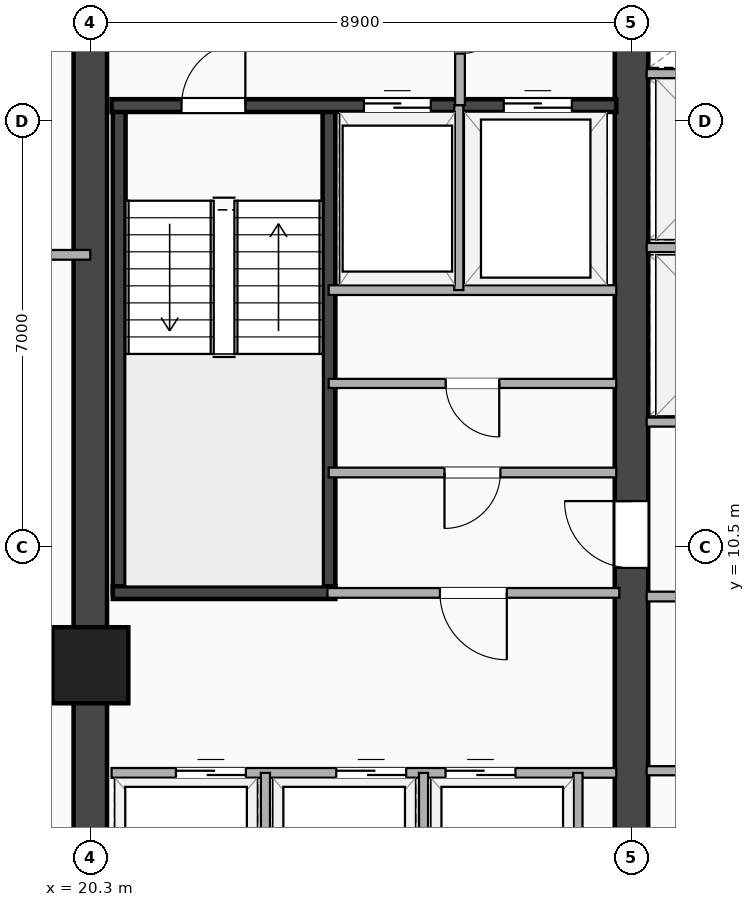
"""IFC4 building model, lengths in metres.
Left out: names, types, materials, properties, quantities, classifications, styles, units other than length and angle.
Written with IfcOpenShell. Run it as: python <this file> out.ifc"""

import sys

from ifc_helpers import new_model, si_unit, direction, frame, frame_2d, origin, origin_2d, place, context, subcontext, project, spatial, rectangle, extrude, element, fill, save


model = new_model("IFC4")
c1 = context("Model", 3, precision=1e-05, world=origin(), true_north=direction((0.0, 1.0)))
c2 = subcontext(c1, "Body", "Model", "MODEL_VIEW")
j1 = project(units=[si_unit("LENGTHUNIT", "METRE"), si_unit("PLANEANGLEUNIT", "RADIAN")], contexts=[c1])
p1 = place(None, origin())
s1 = spatial("IfcSite", under=j1, at=p1, CompositionType="ELEMENT")
p2 = place(p1, origin())
s2 = spatial("IfcBuilding", under=s1, at=p2, CompositionType="ELEMENT")
p3 = place(p2, frame((0.0, 0.0, 91.7)))
s3 = spatial("IfcBuildingStorey", under=s2, at=p3, CompositionType="ELEMENT", Elevation=91.7)
p4 = place(p3, frame((20.3, 3.5, 0.0), z_axis=(0.0, 0.0, 1.0), x_axis=(0.0, 1.0, 0.0)))
e1 = element("IfcWall", 1, at=p4, inside=s3, PredefinedType="SHEAR", context=c2, shape_type="SweptSolid", body=[
    extrude(rectangle(XDim=16.9, YDim=0.55, at=frame_2d((8.45, 0.0))), origin(), (0.0, 0.0, 1.0), 3.24),
])
p5 = place(p3, frame((29.2, 3.5, 0.0), z_axis=(0.0, 0.0, 1.0), x_axis=(0.0, 1.0, 0.0)))
e2 = element("IfcWall", 2, at=p5, inside=s3, PredefinedType="SHEAR", context=c2, shape_type="SweptSolid", body=[
    extrude(rectangle(XDim=16.9, YDim=0.55, at=frame_2d((8.45, 0.0))), origin(), (0.0, 0.0, 1.0), 3.24),
])
p6 = place(p5, frame((7.75, 0.0, 0.0), z_axis=(0.0, 0.0, 1.0), x_axis=(-1.0, 0.0, 0.0)))
e3 = element("IfcOpeningElement", 3, at=p6, cuts=e2, PredefinedType="OPENING", context=c2, shape_type="SweptSolid", body=[
    extrude(rectangle(XDim=1.1, YDim=2.15, at=frame_2d((0.55, 1.075))), frame((0.0, 0.285, 0.0), z_axis=(0.0, -1.0, 0.0), x_axis=(1.0, 0.0, 0.0)), (0.0, 0.0, 1.0), 0.57),
])
for number, where, z_axis, x_axis in (
    (4, (20.775, 9.745, 0.0), (0.0, 0.0, 1.0), (0.0, 1.0, 0.0)),
    (5, (24.225, 9.745, 0.0), (0.0, 0.0, 1.0), (0.0, 1.0, 0.0)),
):
    element("IfcWall", number, at=place(p3, frame(where, z_axis=z_axis, x_axis=x_axis)), inside=s3, PredefinedType="SHEAR", context=c2, shape_type="SweptSolid", body=[
        extrude(rectangle(XDim=8.01, YDim=0.21, at=frame_2d((4.005, 0.0))), origin(), (0.0, 0.0, 1.0), 3.24),
    ])
p7 = place(p3, frame((20.67, 9.745, 0.0), z_axis=(0.0, 0.0, 1.0), x_axis=(1.0, 0.0, 0.0)))
e6 = element("IfcWall", 6, at=p7, inside=s3, PredefinedType="SHEAR", context=c2, shape_type="SweptSolid", body=[
    extrude(rectangle(XDim=3.66, YDim=0.21, at=frame_2d((1.83, 0.0))), origin(), (0.0, 0.0, 1.0), 3.24),
])
p8 = place(p3, frame((20.65, 17.755, 0.0), z_axis=(0.0, 0.0, 1.0), x_axis=(1.0, 0.0, 0.0)))
e7 = element("IfcWall", 7, at=p8, inside=s3, PredefinedType="SHEAR", context=c2, shape_type="SweptSolid", body=[
    extrude(rectangle(XDim=8.3, YDim=0.21, at=frame_2d((4.15, 0.0))), origin(), (0.0, 0.0, 1.0), 3.24),
])
p9 = place(p8, frame((2.2, 0.0, 0.0), z_axis=(0.0, 0.0, 1.0), x_axis=(-1.0, 0.0, 0.0)))
e8 = element("IfcOpeningElement", 8, at=p9, cuts=e7, PredefinedType="OPENING", context=c2, shape_type="SweptSolid", body=[
    extrude(rectangle(XDim=1.05, YDim=2.15, at=frame_2d((0.525, 1.075))), frame((0.0, 0.115, 0.0), z_axis=(0.0, -1.0, 0.0), x_axis=(1.0, 0.0, 0.0)), (0.0, 0.0, 1.0), 0.23),
])
p10 = place(p8, frame((4.15, 0.0, 0.0)))
e9 = element("IfcOpeningElement", 9, at=p10, cuts=e7, PredefinedType="OPENING", context=c2, shape_type="SweptSolid", body=[
    extrude(rectangle(XDim=1.1, YDim=2.18, at=frame_2d((0.55, 1.09))), frame((0.0, 0.115, 0.0), z_axis=(0.0, -1.0, 0.0), x_axis=(1.0, 0.0, 0.0)), (0.0, 0.0, 1.0), 0.23),
])
p11 = place(p8, frame((6.45, 0.0, 0.0)))
e10 = element("IfcOpeningElement", 10, at=p11, cuts=e7, PredefinedType="OPENING", context=c2, shape_type="SweptSolid", body=[
    extrude(rectangle(XDim=1.12, YDim=2.2, at=frame_2d((0.56, 1.1))), frame((0.0, 0.115, 0.0), z_axis=(0.0, -1.0, 0.0), x_axis=(1.0, 0.0, 0.0)), (0.0, 0.0, 1.0), 0.23),
])
p12 = place(p3, frame((20.3, 8.55, -0.26), z_axis=(0.0, 0.0, 1.0), x_axis=(1.0, 0.0, 0.0)))
e11 = element("IfcColumn", 11, at=p12, inside=s3, PredefinedType="COLUMN", context=c2, shape_type="SweptSolid", body=[
    extrude(rectangle(XDim=1.25, YDim=1.25, at=origin_2d()), origin(), (0.0, 0.0, 1.0), 3.5),
])
p13 = place(p3, frame((26.38, 17.76, 0.0), z_axis=(0.0, 0.0, 1.0), x_axis=(0.0, 1.0, 0.0)))
e12 = element("IfcWall", 12, at=p13, inside=s3, PredefinedType="PARTITIONING", context=c2, shape_type="SweptSolid", body=[
    extrude(rectangle(XDim=2.66, YDim=0.16, at=frame_2d((1.33, 0.0))), origin(), (0.0, 0.0, 1.0), 2.614),
])
p14 = place(p13, frame((0.85, 0.0, 0.0)))
e13 = element("IfcOpeningElement", 13, at=p14, cuts=e12, PredefinedType="OPENING", context=c2, shape_type="SweptSolid", body=[
    extrude(rectangle(XDim=0.88, YDim=2.08, at=frame_2d((0.44, 1.04))), frame((0.0, 0.09, 0.0), z_axis=(0.0, -1.0, 0.0), x_axis=(1.0, 0.0, 0.0)), (0.0, 0.0, 1.0), 0.18),
])
p15 = place(p3, frame((24.22, 14.72, 0.0), z_axis=(0.0, 0.0, 1.0), x_axis=(1.0, 0.0, 0.0)))
e14 = element("IfcWall", 14, at=p15, inside=s3, PredefinedType="PARTITIONING", context=c2, shape_type="SweptSolid", body=[
    extrude(rectangle(XDim=4.73, YDim=0.16, at=frame_2d((2.365, 0.0))), origin(), (0.0, 0.0, 1.0), 3.24),
])
p16 = place(p3, frame((26.36, 14.72, 0.0), z_axis=(0.0, 0.0, 1.0), x_axis=(0.0, 1.0, 0.0)))
e15 = element("IfcWall", 15, at=p16, inside=s3, PredefinedType="PARTITIONING", context=c2, shape_type="SweptSolid", body=[
    extrude(rectangle(XDim=3.04, YDim=0.15, at=frame_2d((1.52, 0.0))), origin(), (0.0, 0.0, 1.0), 3.24),
])
p17 = place(p3, frame((24.22, 11.72, 0.0), z_axis=(0.0, 0.0, 1.0), x_axis=(1.0, 0.0, 0.0)))
e16 = element("IfcWall", 16, at=p17, inside=s3, PredefinedType="PARTITIONING", context=c2, shape_type="SweptSolid", body=[
    extrude(rectangle(XDim=4.73, YDim=0.16, at=frame_2d((2.365, 0.0))), origin(), (0.0, 0.0, 1.0), 3.24),
])
p18 = place(p17, frame((1.905, 0.0, 0.0)))
e17 = element("IfcOpeningElement", 17, at=p18, cuts=e16, PredefinedType="OPENING", context=c2, shape_type="SweptSolid", body=[
    extrude(rectangle(XDim=0.92, YDim=2.08, at=frame_2d((0.46, 1.04))), frame((0.0, 0.09, 0.0), z_axis=(0.0, -1.0, 0.0), x_axis=(1.0, 0.0, 0.0)), (0.0, 0.0, 1.0), 0.18),
])
p19 = place(p3, frame((24.22, 13.185, 0.0), z_axis=(0.0, 0.0, 1.0), x_axis=(1.0, 0.0, 0.0)))
e18 = element("IfcWall", 18, at=p19, inside=s3, PredefinedType="PARTITIONING", context=c2, shape_type="SweptSolid", body=[
    extrude(rectangle(XDim=4.73, YDim=0.15, at=frame_2d((2.365, 0.0))), origin(), (0.0, 0.0, 1.0), 3.24),
])
p20 = place(p19, frame((1.925, 0.0, 0.0)))
e19 = element("IfcOpeningElement", 19, at=p20, cuts=e18, PredefinedType="OPENING", context=c2, shape_type="SweptSolid", body=[
    extrude(rectangle(XDim=0.88, YDim=2.08, at=frame_2d((0.44, 1.04))), frame((0.0, 0.085, 0.0), z_axis=(0.0, -1.0, 0.0), x_axis=(1.0, 0.0, 0.0)), (0.0, 0.0, 1.0), 0.17),
])
p21 = place(p3, frame((20.65, 6.78, 0.0), z_axis=(0.0, 0.0, 1.0), x_axis=(1.0, 0.0, 0.0)))
e20 = element("IfcWall", 20, at=p21, inside=s3, PredefinedType="PARTITIONING", context=c2, shape_type="SweptSolid", body=[
    extrude(rectangle(XDim=8.3, YDim=0.16, at=frame_2d((4.15, 0.0))), origin(), (0.0, 0.0, 1.0), 2.313),
])
p22 = place(p21, frame((3.695, 0.0, 0.0)))
e21 = element("IfcOpeningElement", 21, at=p22, cuts=e20, PredefinedType="OPENING", context=c2, shape_type="SweptSolid", body=[
    extrude(rectangle(XDim=1.15, YDim=2.2, at=frame_2d((0.575, 1.1))), frame((0.0, 0.09, 0.0), z_axis=(0.0, -1.0, 0.0), x_axis=(1.0, 0.0, 0.0)), (0.0, 0.0, 1.0), 0.18),
])
p23 = place(p21, frame((5.492, 0.0, 0.0)))
e22 = element("IfcOpeningElement", 22, at=p23, cuts=e20, PredefinedType="OPENING", context=c2, shape_type="SweptSolid", body=[
    extrude(rectangle(XDim=1.15, YDim=2.2, at=frame_2d((0.575, 1.1))), frame((0.0, 0.09, 0.0), z_axis=(0.0, -1.0, 0.0), x_axis=(1.0, 0.0, 0.0)), (0.0, 0.0, 1.0), 0.18),
])
p24 = place(p21, frame((1.059, 0.0, 0.0)))
e23 = element("IfcOpeningElement", 23, at=p24, cuts=e20, PredefinedType="OPENING", context=c2, shape_type="SweptSolid", body=[
    extrude(rectangle(XDim=1.15, YDim=2.2, at=frame_2d((0.575, 1.1))), frame((0.0, 0.09, 0.0), z_axis=(0.0, -1.0, 0.0), x_axis=(1.0, 0.0, 0.0)), (0.0, 0.0, 1.0), 0.18),
])
for number, where, z_axis, x_axis in (
    (24, (23.18, 3.9, 0.0), (0.0, 0.0, 1.0), (0.0, 1.0, 0.0)),
    (25, (25.78, 3.9, 0.0), (0.0, 0.0, 1.0), (0.0, 1.0, 0.0)),
    (26, (28.32, 3.9, 0.0), (0.0, 0.0, 1.0), (0.0, 1.0, 0.0)),
):
    element("IfcWall", number, at=place(p3, frame(where, z_axis=z_axis, x_axis=x_axis)), inside=s3, PredefinedType="PARTITIONING", context=c2, shape_type="SweptSolid", body=[
        extrude(rectangle(XDim=2.88, YDim=0.15, at=frame_2d((1.44, 0.0))), origin(), (0.0, 0.0, 1.0), 3.24),
    ])
p25 = place(p3, frame((24.2, 9.74, 0.0), z_axis=(0.0, 0.0, 1.0), x_axis=(1.0, 0.0, 0.0)))
e27 = element("IfcWall", 27, at=p25, inside=s3, PredefinedType="PARTITIONING", context=c2, shape_type="SweptSolid", body=[
    extrude(rectangle(XDim=4.8, YDim=0.16, at=frame_2d((2.4, 0.0))), origin(), (0.0, 0.0, 1.0), 3.24),
])
p26 = place(p25, frame((1.85, 0.0, 0.0)))
e28 = element("IfcOpeningElement", 28, at=p26, cuts=e27, PredefinedType="OPENING", context=c2, shape_type="SweptSolid", body=[
    extrude(rectangle(XDim=1.1, YDim=2.15, at=frame_2d((0.55, 1.075))), frame((0.0, 0.09, 0.0), z_axis=(0.0, -1.0, 0.0), x_axis=(1.0, 0.0, 0.0)), (0.0, 0.0, 1.0), 0.18),
])
p27 = place(p3, frame((29.45, 9.68, 0.0), z_axis=(0.0, 0.0, 1.0), x_axis=(1.0, 0.0, 0.0)))
e29 = element("IfcWall", 29, at=p27, inside=s3, PredefinedType="PARTITIONING", context=c2, shape_type="SweptSolid", body=[
    extrude(rectangle(XDim=7.3, YDim=0.16, at=frame_2d((3.65, 0.0))), origin(), (0.0, 0.0, 1.0), 3.24),
])
p28 = place(p27, frame((4.11, 0.0, 0.0), z_axis=(0.0, 0.0, 1.0), x_axis=(-1.0, 0.0, 0.0)))
e30 = element("IfcOpeningElement", 30, at=p28, cuts=e29, PredefinedType="OPENING", context=c2, shape_type="SweptSolid", body=[
    extrude(rectangle(XDim=0.92, YDim=2.08, at=frame_2d((0.46, 1.04))), frame((0.0, 0.09, 0.0), z_axis=(0.0, -1.0, 0.0), x_axis=(1.0, 0.0, 0.0)), (0.0, 0.0, 1.0), 0.18),
])
p29 = place(p3, frame((29.45, 6.815, 0.0), z_axis=(0.0, 0.0, 1.0), x_axis=(1.0, 0.0, 0.0)))
e31 = element("IfcWall", 31, at=p29, inside=s3, PredefinedType="PARTITIONING", context=c2, shape_type="SweptSolid", body=[
    extrude(rectangle(XDim=7.3, YDim=0.15, at=frame_2d((3.65, 0.0))), origin(), (0.0, 0.0, 1.0), 3.24),
])
p30 = place(p29, frame((4.09, 0.0, 0.0), z_axis=(0.0, 0.0, 1.0), x_axis=(-1.0, 0.0, 0.0)))
e32 = element("IfcOpeningElement", 32, at=p30, cuts=e31, PredefinedType="OPENING", context=c2, shape_type="SweptSolid", body=[
    extrude(rectangle(XDim=0.88, YDim=2.08, at=frame_2d((0.44, 1.04))), frame((0.0, 0.085, 0.0), z_axis=(0.0, -1.0, 0.0), x_axis=(1.0, 0.0, 0.0)), (0.0, 0.0, 1.0), 0.17),
])
for number, where, z_axis, x_axis in (
    (33, (29.45, 12.55, 0.0), (0.0, 0.0, 1.0), (1.0, 0.0, 0.0)),
    (34, (29.45, 15.42, 0.0), (0.0, 0.0, 1.0), (1.0, 0.0, 0.0)),
    (35, (29.45, 18.28, 0.0), (0.0, 0.0, 1.0), (1.0, 0.0, 0.0)),
):
    element("IfcWall", number, at=place(p3, frame(where, z_axis=z_axis, x_axis=x_axis)), inside=s3, PredefinedType="PARTITIONING", context=c2, shape_type="SweptSolid", body=[
        extrude(rectangle(XDim=2.77, YDim=0.15, at=frame_2d((1.385, 0.0))), origin(), (0.0, 0.0, 1.0), 3.24),
    ])
p31 = place(p3, frame((16.65, 15.3, 0.0), z_axis=(0.0, 0.0, 1.0), x_axis=(1.0, 0.0, 0.0)))
e36 = element("IfcWall", 36, at=p31, inside=s3, PredefinedType="PARTITIONING", context=c2, shape_type="SweptSolid", body=[
    extrude(rectangle(XDim=3.65, YDim=0.16, at=frame_2d((1.825, 0.0))), origin(), (0.0, 0.0, 1.0), 2.313),
])
p32 = place(p31, frame((1.37, 0.0, 0.0), z_axis=(0.0, 0.0, 1.0), x_axis=(-1.0, 0.0, 0.0)))
e37 = element("IfcOpeningElement", 37, at=p32, cuts=e36, PredefinedType="OPENING", context=c2, shape_type="SweptSolid", body=[
    extrude(rectangle(XDim=0.92, YDim=2.08, at=frame_2d((0.46, 1.04))), frame((0.0, 0.09, 0.0), z_axis=(0.0, -1.0, 0.0), x_axis=(1.0, 0.0, 0.0)), (0.0, 0.0, 1.0), 0.18),
])
p33 = place(p9, origin())
e38 = element("IfcDoor", 38, at=p33, inside=s3, OperationType="SINGLE_SWING_RIGHT", PredefinedType="DOOR", context=c2, shape_type="SweptSolid", body=[
    extrude(rectangle(XDim=1.05, YDim=2.15, at=frame_2d((0.525, 1.075))), frame((0.0, 0.025, 0.0), z_axis=(0.0, -1.0, 0.0), x_axis=(1.0, 0.0, 0.0)), (0.0, 0.0, 1.0), 0.05),
])
fill(e8, e38)
p34 = place(p10, origin())
e39 = element("IfcDoor", 39, at=p34, inside=s3, OperationType="DOUBLE_DOOR_SLIDING", PredefinedType="DOOR", context=c2, shape_type="SweptSolid", body=[
    extrude(rectangle(XDim=1.1, YDim=2.18, at=frame_2d((0.55, 1.09))), frame((0.0, 0.025, 0.0), z_axis=(0.0, -1.0, 0.0), x_axis=(1.0, 0.0, 0.0)), (0.0, 0.0, 1.0), 0.05),
])
fill(e9, e39)
p35 = place(p11, origin())
e40 = element("IfcDoor", 40, at=p35, inside=s3, OperationType="DOUBLE_DOOR_SLIDING", PredefinedType="DOOR", context=c2, shape_type="SweptSolid", body=[
    extrude(rectangle(XDim=1.12, YDim=2.2, at=frame_2d((0.56, 1.1))), frame((0.0, 0.025, 0.0), z_axis=(0.0, -1.0, 0.0), x_axis=(1.0, 0.0, 0.0)), (0.0, 0.0, 1.0), 0.05),
])
fill(e10, e40)
p36 = place(p6, origin())
e41 = element("IfcDoor", 41, at=p36, inside=s3, OperationType="SINGLE_SWING_RIGHT", PredefinedType="DOOR", context=c2, shape_type="SweptSolid", body=[
    extrude(rectangle(XDim=1.1, YDim=2.15, at=frame_2d((0.55, 1.075))), frame((0.0, 0.025, 0.0), z_axis=(0.0, -1.0, 0.0), x_axis=(1.0, 0.0, 0.0)), (0.0, 0.0, 1.0), 0.05),
])
fill(e3, e41)
p37 = place(p14, origin())
e42 = element("IfcDoor", 42, at=p37, inside=s3, OperationType="SINGLE_SWING_RIGHT", PredefinedType="DOOR", context=c2, shape_type="SweptSolid", body=[
    extrude(rectangle(XDim=0.88, YDim=2.08, at=frame_2d((0.44, 1.04))), frame((0.0, 0.025, 0.0), z_axis=(0.0, -1.0, 0.0), x_axis=(1.0, 0.0, 0.0)), (0.0, 0.0, 1.0), 0.05),
])
fill(e13, e42)
p38 = place(p18, origin())
e43 = element("IfcDoor", 43, at=p38, inside=s3, OperationType="SINGLE_SWING_LEFT", PredefinedType="DOOR", context=c2, shape_type="SweptSolid", body=[
    extrude(rectangle(XDim=0.92, YDim=2.08, at=frame_2d((0.46, 1.04))), frame((0.0, 0.025, 0.0), z_axis=(0.0, -1.0, 0.0), x_axis=(1.0, 0.0, 0.0)), (0.0, 0.0, 1.0), 0.05),
])
fill(e17, e43)
p39 = place(p20, origin())
e44 = element("IfcDoor", 44, at=p39, inside=s3, OperationType="SINGLE_SWING_RIGHT", PredefinedType="DOOR", context=c2, shape_type="SweptSolid", body=[
    extrude(rectangle(XDim=0.88, YDim=2.08, at=frame_2d((0.44, 1.04))), frame((0.0, 0.025, 0.0), z_axis=(0.0, -1.0, 0.0), x_axis=(1.0, 0.0, 0.0)), (0.0, 0.0, 1.0), 0.05),
])
fill(e19, e44)
p40 = place(p22, origin())
e45 = element("IfcDoor", 45, at=p40, inside=s3, OperationType="DOUBLE_DOOR_SLIDING", PredefinedType="DOOR", context=c2, shape_type="SweptSolid", body=[
    extrude(rectangle(XDim=1.15, YDim=2.2, at=frame_2d((0.575, 1.1))), frame((0.0, 0.025, 0.0), z_axis=(0.0, -1.0, 0.0), x_axis=(1.0, 0.0, 0.0)), (0.0, 0.0, 1.0), 0.05),
])
fill(e21, e45)
p41 = place(p23, origin())
e46 = element("IfcDoor", 46, at=p41, inside=s3, OperationType="DOUBLE_DOOR_SLIDING", PredefinedType="DOOR", context=c2, shape_type="SweptSolid", body=[
    extrude(rectangle(XDim=1.15, YDim=2.2, at=frame_2d((0.575, 1.1))), frame((0.0, 0.025, 0.0), z_axis=(0.0, -1.0, 0.0), x_axis=(1.0, 0.0, 0.0)), (0.0, 0.0, 1.0), 0.05),
])
fill(e22, e46)
p42 = place(p24, origin())
e47 = element("IfcDoor", 47, at=p42, inside=s3, OperationType="DOUBLE_DOOR_SLIDING", PredefinedType="DOOR", context=c2, shape_type="SweptSolid", body=[
    extrude(rectangle(XDim=1.15, YDim=2.2, at=frame_2d((0.575, 1.1))), frame((0.0, 0.025, 0.0), z_axis=(0.0, -1.0, 0.0), x_axis=(1.0, 0.0, 0.0)), (0.0, 0.0, 1.0), 0.05),
])
fill(e23, e47)
p43 = place(p26, origin())
e48 = element("IfcDoor", 48, at=p43, inside=s3, OperationType="SINGLE_SWING_RIGHT", PredefinedType="DOOR", context=c2, shape_type="SweptSolid", body=[
    extrude(rectangle(XDim=1.1, YDim=2.15, at=frame_2d((0.55, 1.075))), frame((0.0, 0.025, 0.0), z_axis=(0.0, -1.0, 0.0), x_axis=(1.0, 0.0, 0.0)), (0.0, 0.0, 1.0), 0.05),
])
fill(e28, e48)
save(model, sys.argv[1])
